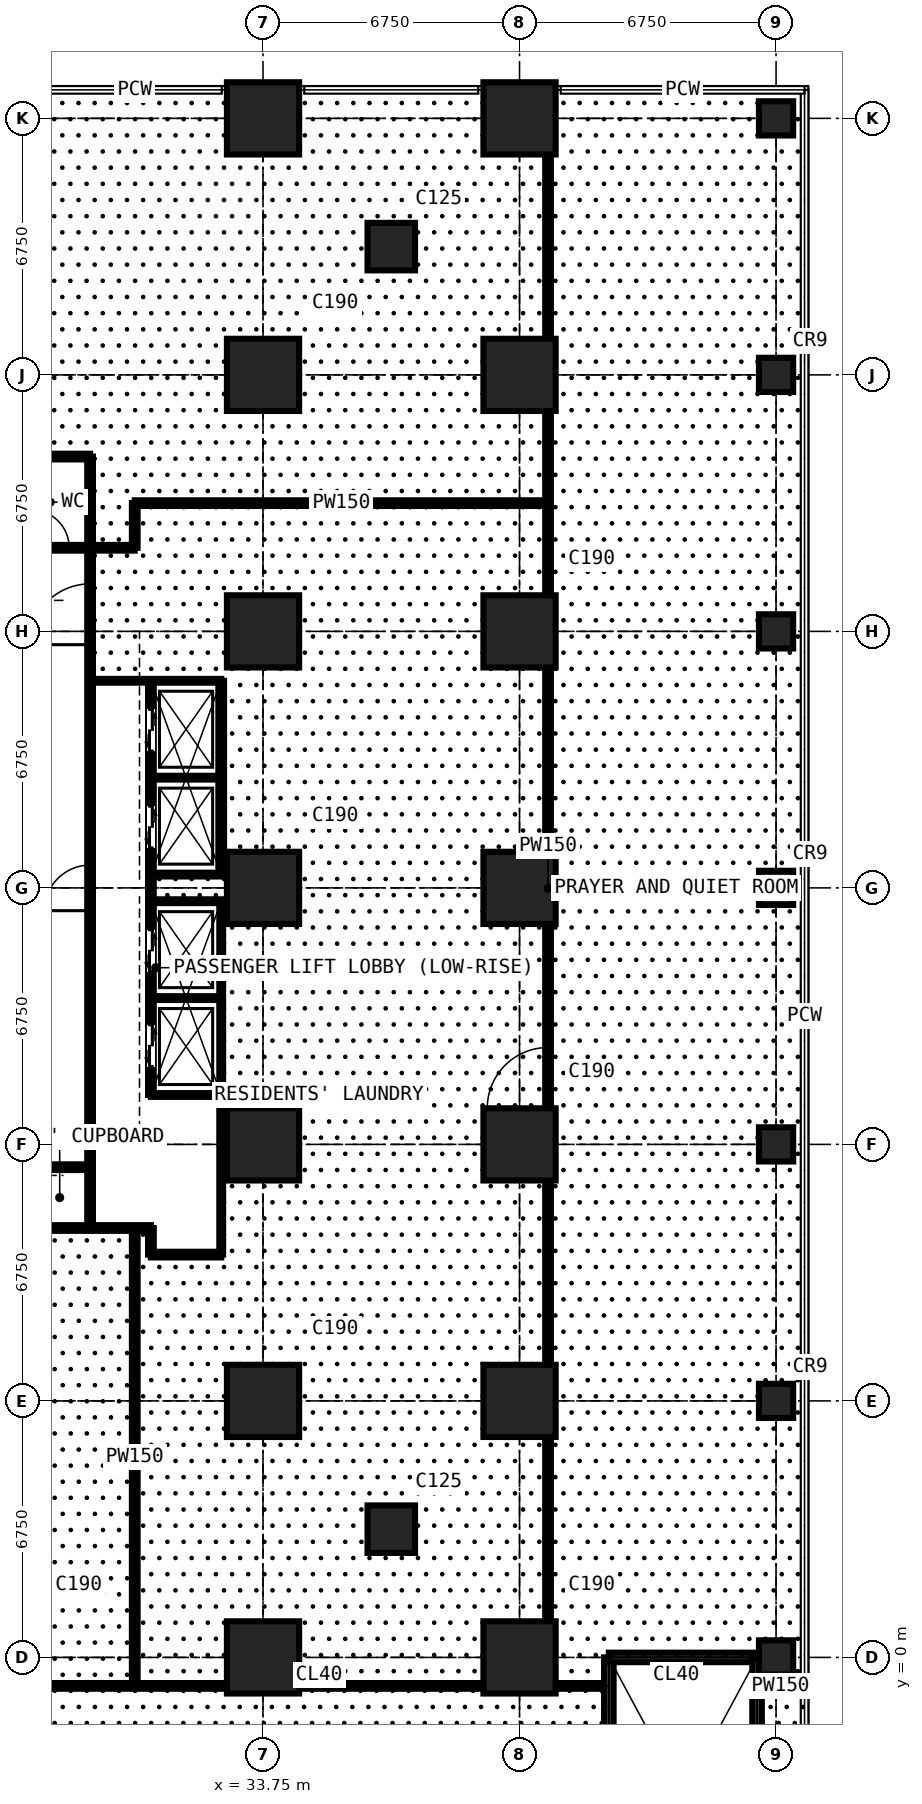
"""IFC4 building model, lengths in metres.
Left out: names, types, materials, properties, quantities, classifications, styles, units other than length and angle.
Written with IfcOpenShell. Run it as: python <this file> out.ifc"""

import sys

from ifc_helpers import new_model, si_unit, direction, frame, frame_2d, origin, origin_2d, place, context, subcontext, project, spatial, rectangle, circle, extrude, element, fill, save


model = new_model("IFC4")
c1 = context("Model", 3, precision=1e-05, world=origin(), true_north=direction((0.0, 1.0)))
c2 = subcontext(c1, "Body", "Model", "MODEL_VIEW")
j1 = project(units=[si_unit("LENGTHUNIT", "METRE"), si_unit("PLANEANGLEUNIT", "RADIAN")], contexts=[c1])
p1 = place(None, origin())
s1 = spatial("IfcSite", under=j1, at=p1, CompositionType="ELEMENT")
p2 = place(p1, origin())
s2 = spatial("IfcBuilding", under=s1, at=p2, CompositionType="ELEMENT")
p3 = place(p2, frame((0.0, 0.0, 9.0)))
s3 = spatial("IfcBuildingStorey", under=s2, at=p3, CompositionType="ELEMENT", Elevation=9.0)
for number, where, z_axis, x_axis in (
    (1, (33.75, 0.0, 0.0), (0.0, 0.0, 1.0), (1.0, 0.0, 0.0)),
    (2, (33.75, 6.75, 0.0), (0.0, 0.0, 1.0), (1.0, 0.0, 0.0)),
    (3, (33.75, 13.5, 0.0), (0.0, 0.0, 1.0), (1.0, 0.0, 0.0)),
    (4, (33.75, 20.25, 0.0), (0.0, 0.0, 1.0), (1.0, 0.0, 0.0)),
    (5, (33.75, 27.0, 0.0), (0.0, 0.0, 1.0), (1.0, 0.0, 0.0)),
    (6, (33.75, 33.75, 0.0), (0.0, 0.0, 1.0), (1.0, 0.0, 0.0)),
    (7, (33.75, 40.5, 0.0), (0.0, 0.0, 1.0), (1.0, 0.0, 0.0)),
):
    element("IfcColumn", number, at=place(p3, frame(where, z_axis=z_axis, x_axis=x_axis)), inside=s3, PredefinedType="COLUMN", context=c2, shape_type="SweptSolid", body=[
        extrude(rectangle(XDim=1.9, YDim=1.9, at=origin_2d()), origin(), (0.0, 0.0, 1.0), 4.5),
    ])
for number, where, z_axis, x_axis in (
    (8, (37.125, 3.375, 0.0), (0.0, 0.0, 1.0), (1.0, 0.0, 0.0)),
    (9, (37.125, 37.125, 0.0), (0.0, 0.0, 1.0), (1.0, 0.0, 0.0)),
):
    element("IfcColumn", number, at=place(p3, frame(where, z_axis=z_axis, x_axis=x_axis)), inside=s3, PredefinedType="COLUMN", context=c2, shape_type="SweptSolid", body=[
        extrude(rectangle(XDim=1.25, YDim=1.25, at=origin_2d()), origin(), (0.0, 0.0, 1.0), 4.5),
    ])
for number, where, z_axis, x_axis in (
    (10, (40.5, 0.0, 0.0), (0.0, 0.0, 1.0), (1.0, 0.0, 0.0)),
    (11, (40.5, 6.75, 0.0), (0.0, 0.0, 1.0), (1.0, 0.0, 0.0)),
    (12, (40.5, 13.5, 0.0), (0.0, 0.0, 1.0), (1.0, 0.0, 0.0)),
    (13, (40.5, 20.25, 0.0), (0.0, 0.0, 1.0), (1.0, 0.0, 0.0)),
    (14, (40.5, 27.0, 0.0), (0.0, 0.0, 1.0), (1.0, 0.0, 0.0)),
    (15, (40.5, 33.75, 0.0), (0.0, 0.0, 1.0), (1.0, 0.0, 0.0)),
    (16, (40.5, 40.5, 0.0), (0.0, 0.0, 1.0), (1.0, 0.0, 0.0)),
):
    element("IfcColumn", number, at=place(p3, frame(where, z_axis=z_axis, x_axis=x_axis)), inside=s3, PredefinedType="COLUMN", context=c2, shape_type="SweptSolid", body=[
        extrude(rectangle(XDim=1.9, YDim=1.9, at=origin_2d()), origin(), (0.0, 0.0, 1.0), 4.5),
    ])
for number, where, z_axis, x_axis in (
    (17, (47.25, 0.0, 0.0), (0.0, 0.0, 1.0), (1.0, 0.0, 0.0)),
    (18, (47.25, 6.75, 0.0), (0.0, 0.0, 1.0), (1.0, 0.0, 0.0)),
    (19, (47.25, 13.5, 0.0), (0.0, 0.0, 1.0), (1.0, 0.0, 0.0)),
    (20, (47.25, 20.25, 0.0), (0.0, 0.0, 1.0), (1.0, 0.0, 0.0)),
    (21, (47.25, 27.0, 0.0), (0.0, 0.0, 1.0), (1.0, 0.0, 0.0)),
    (22, (47.25, 33.75, 0.0), (0.0, 0.0, 1.0), (1.0, 0.0, 0.0)),
    (23, (47.25, 40.5, 0.0), (0.0, 0.0, 1.0), (1.0, 0.0, 0.0)),
):
    element("IfcColumn", number, at=place(p3, frame(where, z_axis=z_axis, x_axis=x_axis)), inside=s3, PredefinedType="COLUMN", context=c2, shape_type="SweptSolid", body=[
        extrude(circle(Radius=0.45, at=origin_2d()), origin(), (0.0, 0.0, 1.0), 4.5),
    ])
p4 = place(p3, frame((-7.484, -0.75, 0.0), z_axis=(0.0, 0.0, 1.0), x_axis=(1.0, 0.0, 0.0)))
e24 = element("IfcWall", 24, at=p4, inside=s3, PredefinedType="PARTITIONING", context=c2, shape_type="SweptSolid", body=[
    extrude(rectangle(XDim=50.334, YDim=0.15, at=frame_2d((25.167, 0.0))), origin(), (0.0, 0.0, 1.0), 4.25),
])
p5 = place(p4, frame((21.934, 0.0, 0.0)))
e25 = element("IfcOpeningElement", 25, at=p5, cuts=e24, PredefinedType="OPENING", context=c2, shape_type="SweptSolid", body=[
    extrude(rectangle(XDim=1.6, YDim=2.4, at=frame_2d((0.8, 1.2))), frame((0.0, 0.085, 0.0), z_axis=(0.0, -1.0, 0.0), x_axis=(1.0, 0.0, 0.0)), (0.0, 0.0, 1.0), 0.17),
])
p6 = place(p3, frame((8.9, 29.2, 0.0), z_axis=(0.0, 0.0, 1.0), x_axis=(1.0, 0.0, 0.0)))
e26 = element("IfcWall", 26, at=p6, inside=s3, PredefinedType="PARTITIONING", context=c2, shape_type="SweptSolid", body=[
    extrude(rectangle(XDim=21.475, YDim=0.15, at=frame_2d((10.738, 0.0))), origin(), (0.0, 0.0, 1.0), 4.25),
])
p7 = place(p6, frame((16.65, 0.0, 0.0)))
e27 = element("IfcOpeningElement", 27, at=p7, cuts=e26, PredefinedType="OPENING", context=c2, shape_type="SweptSolid", body=[
    extrude(rectangle(XDim=1.0, YDim=2.2, at=frame_2d((0.5, 1.1))), frame((0.0, 0.085, 0.0), z_axis=(0.0, -1.0, 0.0), x_axis=(1.0, 0.0, 0.0)), (0.0, 0.0, 1.0), 0.17),
])
p8 = place(p6, frame((18.75, 0.0, 0.0)))
e28 = element("IfcOpeningElement", 28, at=p8, cuts=e26, PredefinedType="OPENING", context=c2, shape_type="SweptSolid", body=[
    extrude(rectangle(XDim=1.0, YDim=2.2, at=frame_2d((0.5, 1.1))), frame((0.0, 0.085, 0.0), z_axis=(0.0, -1.0, 0.0), x_axis=(1.0, 0.0, 0.0)), (0.0, 0.0, 1.0), 0.17),
])
p9 = place(p6, frame((8.45, 0.0, 0.0)))
e29 = element("IfcOpeningElement", 29, at=p9, cuts=e26, PredefinedType="OPENING", context=c2, shape_type="SweptSolid", body=[
    extrude(rectangle(XDim=1.6, YDim=2.4, at=frame_2d((0.8, 1.2))), frame((0.0, 0.085, 0.0), z_axis=(0.0, -1.0, 0.0), x_axis=(1.0, 0.0, 0.0)), (0.0, 0.0, 1.0), 0.17),
])
p10 = place(p3, frame((10.125, 11.3, 0.0), z_axis=(0.0, 0.0, 1.0), x_axis=(1.0, 0.0, 0.0)))
e30 = element("IfcWall", 30, at=p10, inside=s3, PredefinedType="PARTITIONING", context=c2, shape_type="SweptSolid", body=[
    extrude(rectangle(XDim=20.675, YDim=0.15, at=frame_2d((10.337, 0.0))), origin(), (0.0, 0.0, 1.0), 4.25),
])
p11 = place(p10, frame((1.725, 0.0, 0.0)))
e31 = element("IfcOpeningElement", 31, at=p11, cuts=e30, PredefinedType="OPENING", context=c2, shape_type="SweptSolid", body=[
    extrude(rectangle(XDim=1.0, YDim=2.2, at=frame_2d((0.5, 1.1))), frame((0.0, 0.085, 0.0), z_axis=(0.0, -1.0, 0.0), x_axis=(1.0, 0.0, 0.0)), (0.0, 0.0, 1.0), 0.17),
])
p12 = place(p10, frame((3.825, 0.0, 0.0)))
e32 = element("IfcOpeningElement", 32, at=p12, cuts=e30, PredefinedType="OPENING", context=c2, shape_type="SweptSolid", body=[
    extrude(rectangle(XDim=1.0, YDim=2.2, at=frame_2d((0.5, 1.1))), frame((0.0, 0.085, 0.0), z_axis=(0.0, -1.0, 0.0), x_axis=(1.0, 0.0, 0.0)), (0.0, 0.0, 1.0), 0.17),
])
p13 = place(p10, frame((10.675, 0.0, 0.0)))
e33 = element("IfcOpeningElement", 33, at=p13, cuts=e30, PredefinedType="OPENING", context=c2, shape_type="SweptSolid", body=[
    extrude(rectangle(XDim=1.5, YDim=2.2, at=frame_2d((0.75, 1.1))), frame((0.0, 0.085, 0.0), z_axis=(0.0, -1.0, 0.0), x_axis=(1.0, 0.0, 0.0)), (0.0, 0.0, 1.0), 0.17),
])
p14 = place(p3, frame((25.0, 31.6, 0.0), z_axis=(0.0, 0.0, 1.0), x_axis=(1.0, 0.0, 0.0)))
e34 = element("IfcWall", 34, at=p14, inside=s3, PredefinedType="PARTITIONING", context=c2, shape_type="SweptSolid", body=[
    extrude(rectangle(XDim=4.2, YDim=0.15, at=frame_2d((2.1, 0.0))), origin(), (0.0, 0.0, 1.0), 4.25),
])
p15 = place(p3, frame((27.6, 12.9, 0.0), z_axis=(0.0, 0.0, 1.0), x_axis=(1.0, 0.0, 0.0)))
e35 = element("IfcWall", 35, at=p15, inside=s3, PredefinedType="PARTITIONING", context=c2, shape_type="SweptSolid", body=[
    extrude(rectangle(XDim=1.6, YDim=0.15, at=frame_2d((0.8, 0.0))), origin(), (0.0, 0.0, 1.0), 3.752),
])
p16 = place(p3, frame((29.2, 11.3, 0.0), z_axis=(0.0, 0.0, 1.0), x_axis=(0.0, 1.0, 0.0)))
e36 = element("IfcWall", 36, at=p16, inside=s3, PredefinedType="PARTITIONING", context=c2, shape_type="SweptSolid", body=[
    extrude(rectangle(XDim=20.3, YDim=0.15, at=frame_2d((10.15, 0.0))), origin(), (0.0, 0.0, 1.0), 4.25),
])
p17 = place(p16, frame((15.35, 0.0, 0.0)))
e37 = element("IfcOpeningElement", 37, at=p17, cuts=e36, PredefinedType="OPENING", context=c2, shape_type="SweptSolid", body=[
    extrude(rectangle(XDim=1.6, YDim=2.4, at=frame_2d((0.8, 1.2))), frame((0.0, 0.085, 0.0), z_axis=(0.0, -1.0, 0.0), x_axis=(1.0, 0.0, 0.0)), (0.0, 0.0, 1.0), 0.17),
])
p18 = place(p16, frame((8.35, 0.0, 0.0)))
e38 = element("IfcOpeningElement", 38, at=p18, cuts=e36, PredefinedType="OPENING", context=c2, shape_type="SweptSolid", body=[
    extrude(rectangle(XDim=1.2, YDim=2.2, at=frame_2d((0.6, 1.1))), frame((0.0, 0.085, 0.0), z_axis=(0.0, -1.0, 0.0), x_axis=(1.0, 0.0, 0.0)), (0.0, 0.0, 1.0), 0.17),
])
p19 = place(p3, frame((29.2, 25.7, 0.0), z_axis=(0.0, 0.0, 1.0), x_axis=(1.0, 0.0, 0.0)))
e39 = element("IfcWall", 39, at=p19, inside=s3, PredefinedType="SHEAR", context=c2, shape_type="SweptSolid", body=[
    extrude(rectangle(XDim=3.45, YDim=0.1, at=frame_2d((1.725, 0.0))), origin(), (0.0, 0.0, 1.0), 4.25),
])
p20 = place(p3, frame((30.375, -0.75, 0.0), z_axis=(0.0, 0.0, 1.0), x_axis=(0.0, 1.0, 0.0)))
e40 = element("IfcWall", 40, at=p20, inside=s3, PredefinedType="PARTITIONING", context=c2, shape_type="SweptSolid", body=[
    extrude(rectangle(XDim=12.05, YDim=0.15, at=frame_2d((6.025, 0.0))), origin(), (0.0, 0.0, 1.0), 4.25),
])
p21 = place(p3, frame((30.375, 29.2, 0.0), z_axis=(0.0, 0.0, 1.0), x_axis=(0.0, 1.0, 0.0)))
e41 = element("IfcWall", 41, at=p21, inside=s3, PredefinedType="PARTITIONING", context=c2, shape_type="SweptSolid", body=[
    extrude(rectangle(XDim=1.175, YDim=0.15, at=frame_2d((0.587, 0.0))), origin(), (0.0, 0.0, 1.0), 4.25),
])
p22 = place(p3, frame((30.375, 30.375, 0.0), z_axis=(0.0, 0.0, 1.0), x_axis=(1.0, 0.0, 0.0)))
e42 = element("IfcWall", 42, at=p22, inside=s3, PredefinedType="PARTITIONING", context=c2, shape_type="SweptSolid", body=[
    extrude(rectangle(XDim=10.875, YDim=0.15, at=frame_2d((5.438, 0.0))), origin(), (0.0, 0.0, 1.0), 4.25),
])
p23 = place(p3, frame((30.8, 10.6, 0.0), z_axis=(0.0, 0.0, 1.0), x_axis=(0.0, 1.0, 0.0)))
e43 = element("IfcWall", 43, at=p23, inside=s3, PredefinedType="PARTITIONING", context=c2, shape_type="SweptSolid", body=[
    extrude(rectangle(XDim=0.7, YDim=0.15, at=frame_2d((0.35, 0.0))), origin(), (0.0, 0.0, 1.0), 4.25),
])
p24 = place(p3, frame((30.8, 10.6, 0.0), z_axis=(0.0, 0.0, 1.0), x_axis=(1.0, 0.0, 0.0)))
e44 = element("IfcWall", 44, at=p24, inside=s3, PredefinedType="PARTITIONING", context=c2, shape_type="SweptSolid", body=[
    extrude(rectangle(XDim=1.85, YDim=0.15, at=frame_2d((0.925, 0.0))), origin(), (0.0, 0.0, 1.0), 4.25),
])
p25 = place(p3, frame((30.8, 14.8, 0.0), z_axis=(0.0, 0.0, 1.0), x_axis=(0.0, 1.0, 0.0)))
e45 = element("IfcWall", 45, at=p25, inside=s3, PredefinedType="PARTITIONING", context=c2, shape_type="SweptSolid", body=[
    extrude(rectangle(XDim=10.9, YDim=0.15, at=frame_2d((5.45, 0.0))), origin(), (0.0, 0.0, 1.0), 4.25),
])
p26 = place(p25, frame((0.75, 0.0, 0.0)))
e46 = element("IfcOpeningElement", 46, at=p26, cuts=e45, PredefinedType="OPENING", context=c2, shape_type="SweptSolid", body=[
    extrude(rectangle(XDim=1.1, YDim=2.2, at=frame_2d((0.55, 1.1))), frame((0.0, 0.085, 0.0), z_axis=(0.0, -1.0, 0.0), x_axis=(1.0, 0.0, 0.0)), (0.0, 0.0, 1.0), 0.17),
])
p27 = place(p25, frame((3.25, 0.0, 0.0)))
e47 = element("IfcOpeningElement", 47, at=p27, cuts=e45, PredefinedType="OPENING", context=c2, shape_type="SweptSolid", body=[
    extrude(rectangle(XDim=1.1, YDim=2.2, at=frame_2d((0.55, 1.1))), frame((0.0, 0.085, 0.0), z_axis=(0.0, -1.0, 0.0), x_axis=(1.0, 0.0, 0.0)), (0.0, 0.0, 1.0), 0.17),
])
p28 = place(p25, frame((6.5, 0.0, 0.0)))
e48 = element("IfcOpeningElement", 48, at=p28, cuts=e45, PredefinedType="OPENING", context=c2, shape_type="SweptSolid", body=[
    extrude(rectangle(XDim=1.1, YDim=2.2, at=frame_2d((0.55, 1.1))), frame((0.0, 0.085, 0.0), z_axis=(0.0, -1.0, 0.0), x_axis=(1.0, 0.0, 0.0)), (0.0, 0.0, 1.0), 0.17),
])
p29 = place(p25, frame((9.05, 0.0, 0.0)))
e49 = element("IfcOpeningElement", 49, at=p29, cuts=e45, PredefinedType="OPENING", context=c2, shape_type="SweptSolid", body=[
    extrude(rectangle(XDim=1.1, YDim=2.2, at=frame_2d((0.55, 1.1))), frame((0.0, 0.085, 0.0), z_axis=(0.0, -1.0, 0.0), x_axis=(1.0, 0.0, 0.0)), (0.0, 0.0, 1.0), 0.17),
])
for number, where, z_axis, x_axis in (
    (50, (30.8, 14.8, 0.0), (0.0, 0.0, 1.0), (1.0, 0.0, 0.0)),
    (51, (30.8, 17.35, 0.0), (0.0, 0.0, 1.0), (1.0, 0.0, 0.0)),
    (52, (30.8, 19.9, 0.0), (0.0, 0.0, 1.0), (1.0, 0.0, 0.0)),
    (53, (30.8, 20.6, 0.0), (0.0, 0.0, 1.0), (1.0, 0.0, 0.0)),
    (54, (30.8, 23.15, 0.0), (0.0, 0.0, 1.0), (1.0, 0.0, 0.0)),
):
    element("IfcWall", number, at=place(p3, frame(where, z_axis=z_axis, x_axis=x_axis)), inside=s3, PredefinedType="SHEAR", context=c2, shape_type="SweptSolid", body=[
        extrude(rectangle(XDim=1.85, YDim=0.1, at=frame_2d((0.925, 0.0))), origin(), (0.0, 0.0, 1.0), 4.25),
    ])
p30 = place(p3, frame((32.65, 10.6, 0.0), z_axis=(0.0, 0.0, 1.0), x_axis=(0.0, 1.0, 0.0)))
e55 = element("IfcWall", 55, at=p30, inside=s3, PredefinedType="SHEAR", context=c2, shape_type="SweptSolid", body=[
    extrude(rectangle(XDim=9.3, YDim=0.1, at=frame_2d((4.65, 0.0))), origin(), (0.0, 0.0, 1.0), 4.25),
])
p31 = place(p3, frame((32.65, 20.6, 0.0), z_axis=(0.0, 0.0, 1.0), x_axis=(0.0, 1.0, 0.0)))
e56 = element("IfcWall", 56, at=p31, inside=s3, PredefinedType="PARTITIONING", context=c2, shape_type="SweptSolid", body=[
    extrude(rectangle(XDim=5.1, YDim=0.15, at=frame_2d((2.55, 0.0))), origin(), (0.0, 0.0, 1.0), 4.25),
])
p32 = place(p3, frame((41.25, -0.75, 0.0), z_axis=(0.0, 0.0, 1.0), x_axis=(0.0, 1.0, 0.0)))
e57 = element("IfcWall", 57, at=p32, inside=s3, PredefinedType="PARTITIONING", context=c2, shape_type="SweptSolid", body=[
    extrude(rectangle(XDim=41.984, YDim=0.15, at=frame_2d((20.992, 0.0))), origin(), (0.0, 0.0, 1.0), 4.25),
])
p33 = place(p32, frame((15.2, 0.0, 0.0)))
e58 = element("IfcOpeningElement", 58, at=p33, cuts=e57, PredefinedType="OPENING", context=c2, shape_type="SweptSolid", body=[
    extrude(rectangle(XDim=1.6, YDim=2.4, at=frame_2d((0.8, 1.2))), frame((0.0, 0.085, 0.0), z_axis=(0.0, -1.0, 0.0), x_axis=(1.0, 0.0, 0.0)), (0.0, 0.0, 1.0), 0.17),
])
p34 = place(p3, frame((42.85, -7.25, 0.0), z_axis=(0.0, 0.0, 1.0), x_axis=(0.0, 1.0, 0.0)))
e59 = element("IfcWall", 59, at=p34, inside=s3, PredefinedType="SOLIDWALL", context=c2, shape_type="SweptSolid", body=[
    extrude(rectangle(XDim=7.25, YDim=0.25, at=frame_2d((3.625, 0.0))), origin(), (0.0, 0.0, 1.0), 4.25),
])
p35 = place(p3, frame((42.85, 0.0, 0.0), z_axis=(0.0, 0.0, 1.0), x_axis=(1.0, 0.0, 0.0)))
e60 = element("IfcWall", 60, at=p35, inside=s3, PredefinedType="SOLIDWALL", context=c2, shape_type="SweptSolid", body=[
    extrude(rectangle(XDim=3.9, YDim=0.25, at=frame_2d((1.95, 0.0))), origin(), (0.0, 0.0, 1.0), 4.25),
])
p36 = place(p3, frame((46.75, -7.25, 0.0), z_axis=(0.0, 0.0, 1.0), x_axis=(0.0, 1.0, 0.0)))
e61 = element("IfcWall", 61, at=p36, inside=s3, PredefinedType="SOLIDWALL", context=c2, shape_type="SweptSolid", body=[
    extrude(rectangle(XDim=7.25, YDim=0.25, at=frame_2d((3.625, 0.0))), origin(), (0.0, 0.0, 1.0), 4.25),
])
p37 = place(p3, frame((46.75, -0.75, 0.0), z_axis=(0.0, 0.0, 1.0), x_axis=(1.0, 0.0, 0.0)))
e62 = element("IfcWall", 62, at=p37, inside=s3, PredefinedType="PARTITIONING", context=c2, shape_type="SweptSolid", body=[
    extrude(rectangle(XDim=1.234, YDim=0.15, at=frame_2d((0.617, 0.0))), origin(), (0.0, 0.0, 1.0), 4.25),
])
p38 = place(p17, origin())
e63 = element("IfcDoor", 63, at=p38, inside=s3, OperationType="DOUBLE_DOOR_SINGLE_SWING", PredefinedType="DOOR", context=c2, shape_type="SweptSolid", body=[
    extrude(rectangle(XDim=1.6, YDim=2.4, at=frame_2d((0.8, 1.2))), frame((0.0, 0.025, 0.0), z_axis=(0.0, -1.0, 0.0), x_axis=(1.0, 0.0, 0.0)), (0.0, 0.0, 1.0), 0.05),
])
fill(e37, e63)
p39 = place(p8, origin())
e64 = element("IfcDoor", 64, at=p39, inside=s3, OperationType="SINGLE_SWING_LEFT", PredefinedType="DOOR", context=c2, shape_type="SweptSolid", body=[
    extrude(rectangle(XDim=1.0, YDim=2.2, at=frame_2d((0.5, 1.1))), frame((0.0, 0.025, 0.0), z_axis=(0.0, -1.0, 0.0), x_axis=(1.0, 0.0, 0.0)), (0.0, 0.0, 1.0), 0.05),
])
fill(e28, e64)
p40 = place(p33, origin())
e65 = element("IfcDoor", 65, at=p40, inside=s3, OperationType="DOUBLE_DOOR_SINGLE_SWING", PredefinedType="DOOR", context=c2, shape_type="SweptSolid", body=[
    extrude(rectangle(XDim=1.6, YDim=2.4, at=frame_2d((0.8, 1.2))), frame((0.0, 0.025, 0.0), z_axis=(0.0, -1.0, 0.0), x_axis=(1.0, 0.0, 0.0)), (0.0, 0.0, 1.0), 0.05),
])
fill(e58, e65)
p41 = place(p26, origin())
e66 = element("IfcDoor", 66, at=p41, inside=s3, OperationType="DOUBLE_DOOR_SLIDING", PredefinedType="DOOR", context=c2, shape_type="SweptSolid", body=[
    extrude(rectangle(XDim=1.1, YDim=2.2, at=frame_2d((0.55, 1.1))), frame((0.0, 0.025, 0.0), z_axis=(0.0, -1.0, 0.0), x_axis=(1.0, 0.0, 0.0)), (0.0, 0.0, 1.0), 0.05),
])
fill(e46, e66)
p42 = place(p27, origin())
e67 = element("IfcDoor", 67, at=p42, inside=s3, OperationType="DOUBLE_DOOR_SLIDING", PredefinedType="DOOR", context=c2, shape_type="SweptSolid", body=[
    extrude(rectangle(XDim=1.1, YDim=2.2, at=frame_2d((0.55, 1.1))), frame((0.0, 0.025, 0.0), z_axis=(0.0, -1.0, 0.0), x_axis=(1.0, 0.0, 0.0)), (0.0, 0.0, 1.0), 0.05),
])
fill(e47, e67)
p43 = place(p28, origin())
e68 = element("IfcDoor", 68, at=p43, inside=s3, OperationType="DOUBLE_DOOR_SLIDING", PredefinedType="DOOR", context=c2, shape_type="SweptSolid", body=[
    extrude(rectangle(XDim=1.1, YDim=2.2, at=frame_2d((0.55, 1.1))), frame((0.0, 0.025, 0.0), z_axis=(0.0, -1.0, 0.0), x_axis=(1.0, 0.0, 0.0)), (0.0, 0.0, 1.0), 0.05),
])
fill(e48, e68)
p44 = place(p29, origin())
e69 = element("IfcDoor", 69, at=p44, inside=s3, OperationType="DOUBLE_DOOR_SLIDING", PredefinedType="DOOR", context=c2, shape_type="SweptSolid", body=[
    extrude(rectangle(XDim=1.1, YDim=2.2, at=frame_2d((0.55, 1.1))), frame((0.0, 0.025, 0.0), z_axis=(0.0, -1.0, 0.0), x_axis=(1.0, 0.0, 0.0)), (0.0, 0.0, 1.0), 0.05),
])
fill(e49, e69)
p45 = place(p18, origin())
e70 = element("IfcDoor", 70, at=p45, inside=s3, OperationType="DOUBLE_DOOR_SINGLE_SWING", PredefinedType="DOOR", context=c2, shape_type="SweptSolid", body=[
    extrude(rectangle(XDim=1.2, YDim=2.2, at=frame_2d((0.6, 1.1))), frame((0.0, 0.025, 0.0), z_axis=(0.0, -1.0, 0.0), x_axis=(1.0, 0.0, 0.0)), (0.0, 0.0, 1.0), 0.05),
])
fill(e38, e70)
save(model, sys.argv[1])
